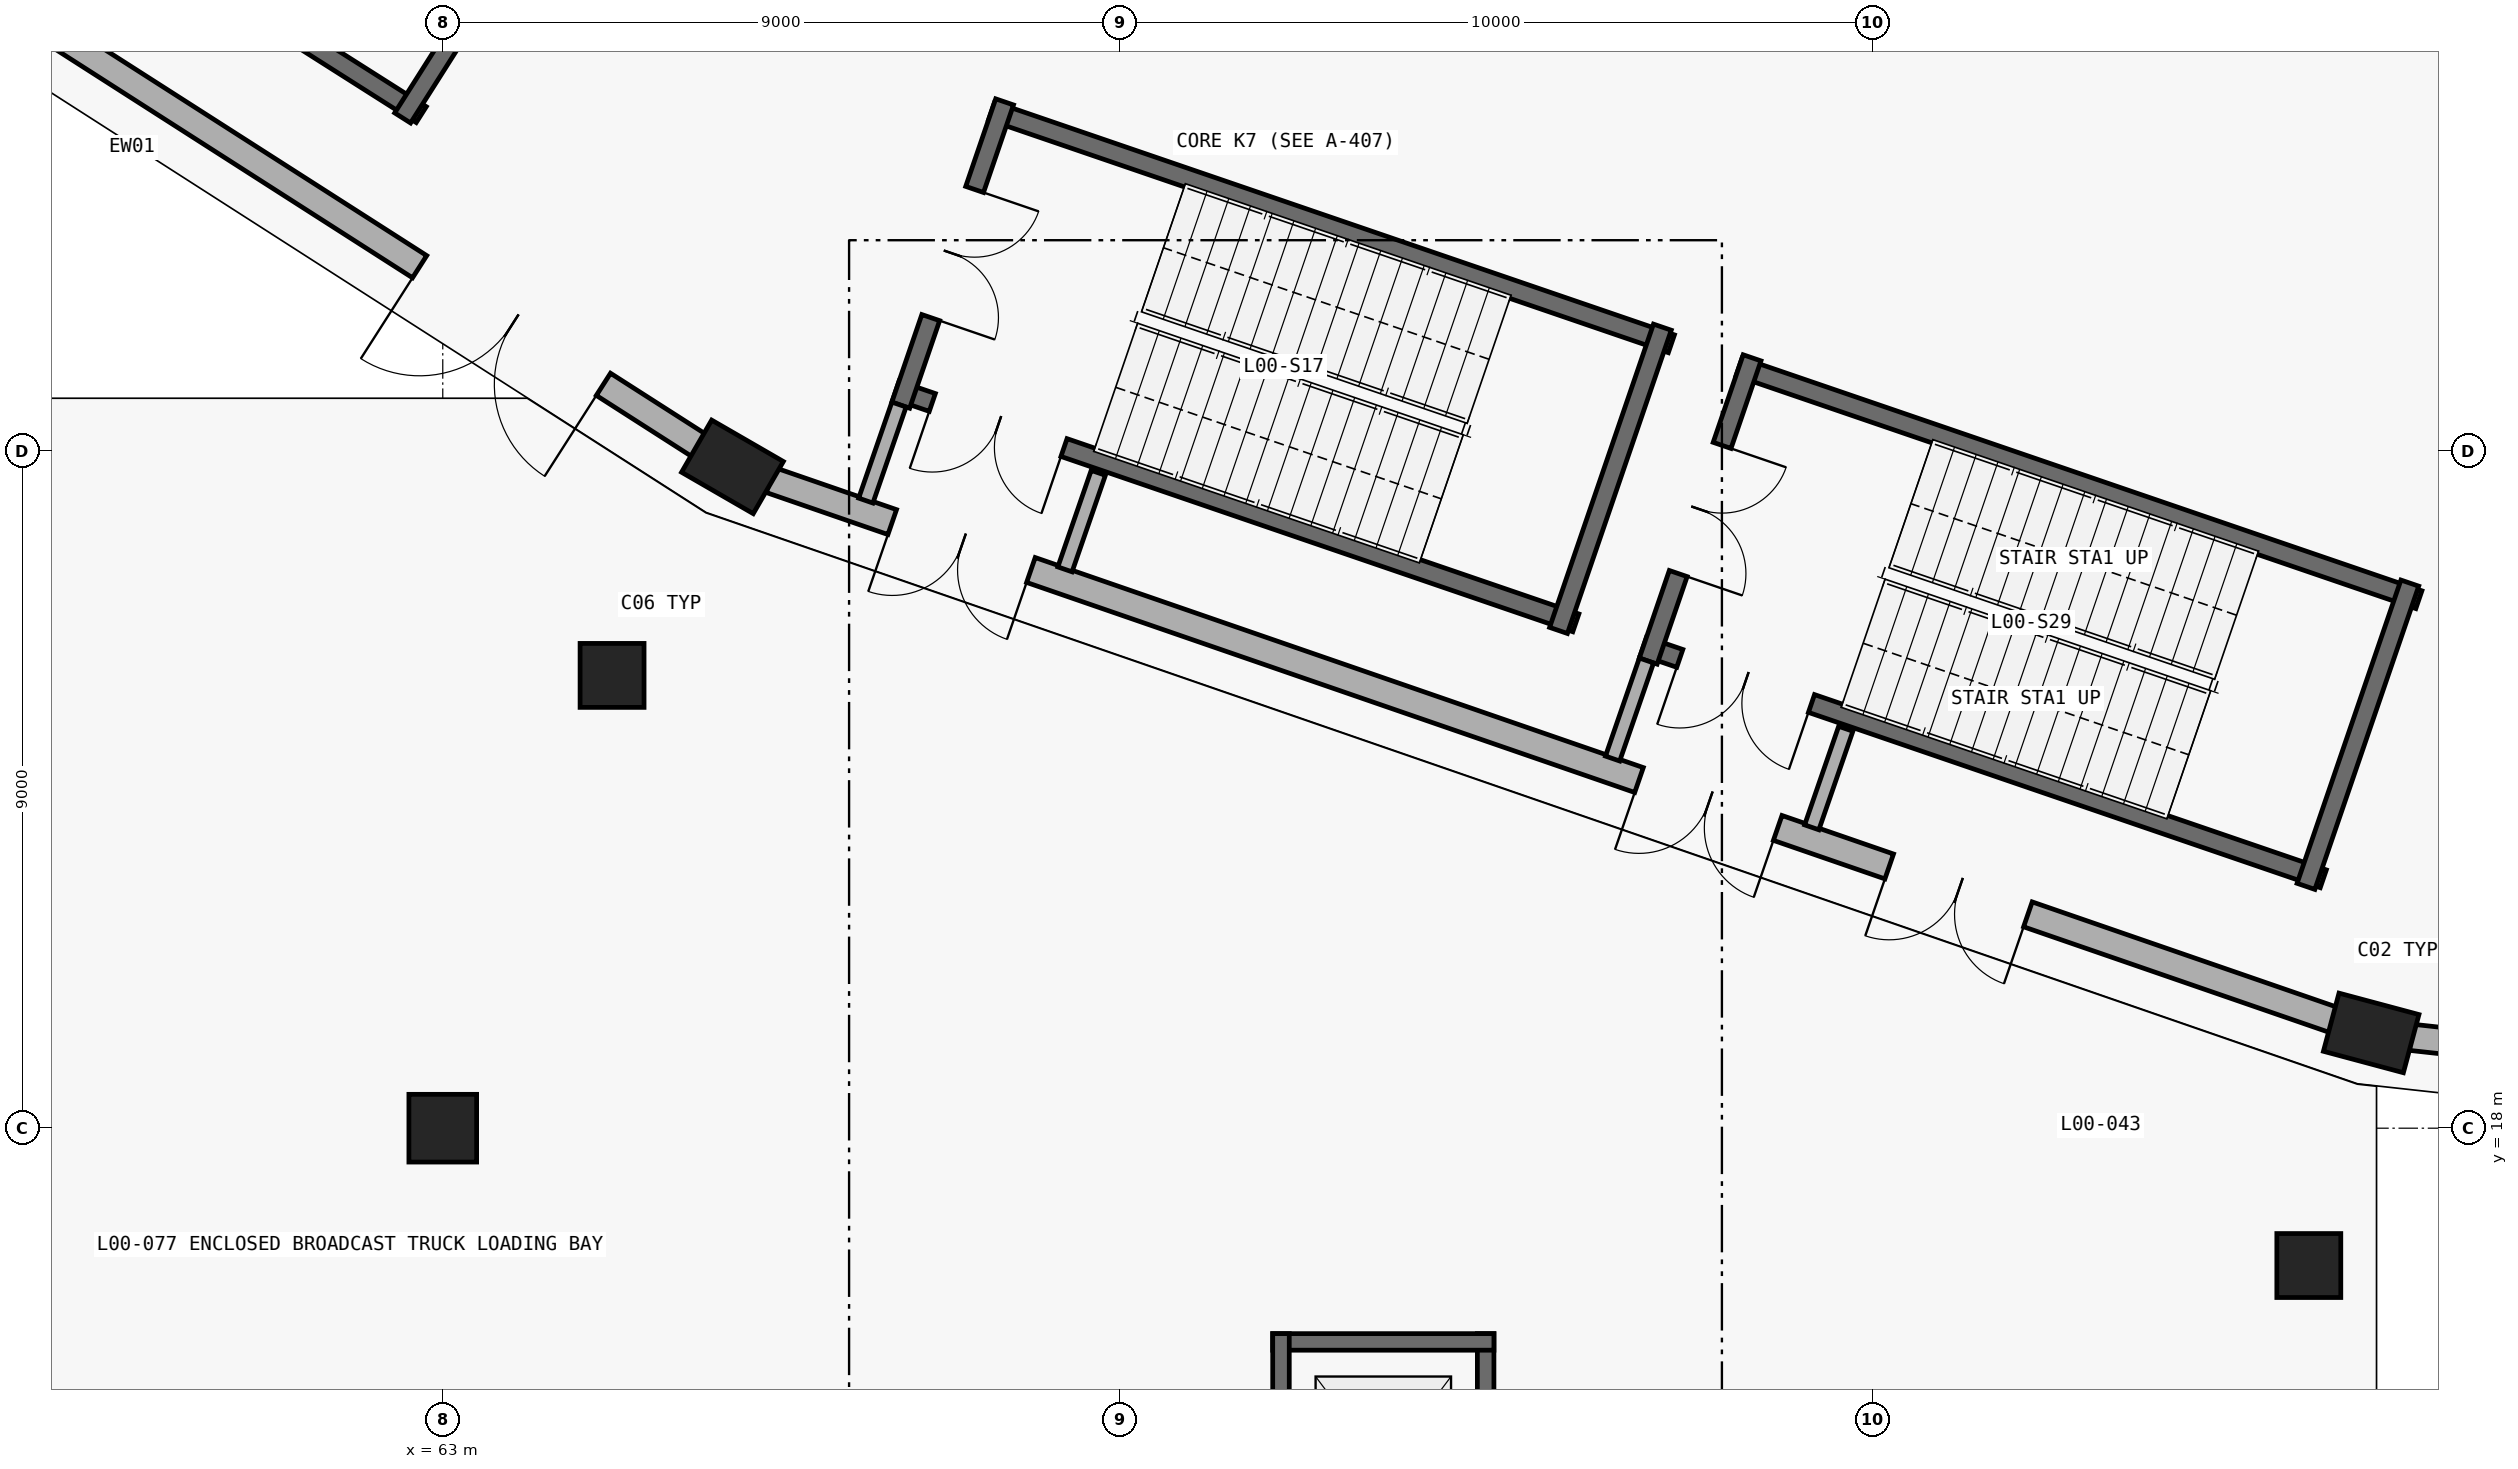
"""IFC4 building model, lengths in metres.
Left out: names, types, materials, properties, quantities, classifications, styles, units other than length and angle.
Written with IfcOpenShell. Run it as: python <this file> out.ifc"""

import sys

from ifc_helpers import new_model, si_unit, direction, frame, frame_2d, origin, origin_2d, place, context, subcontext, project, spatial, rectangle, circle, extrude, element, fill, save


model = new_model("IFC4")
c1 = context("Model", 3, precision=1e-05, world=origin(), true_north=direction((0.0, 1.0)))
c2 = subcontext(c1, "Body", "Model", "MODEL_VIEW")
j1 = project(units=[si_unit("LENGTHUNIT", "METRE"), si_unit("PLANEANGLEUNIT", "RADIAN")], contexts=[c1])
p1 = place(None, origin())
s1 = spatial("IfcSite", under=j1, at=p1, CompositionType="ELEMENT")
p2 = place(p1, origin())
s2 = spatial("IfcBuilding", under=s1, at=p2, CompositionType="ELEMENT")
p3 = place(p2, origin())
s3 = spatial("IfcBuildingStorey", under=s2, at=p3, CompositionType="ELEMENT", Elevation=0.0)
p4 = place(p3, frame((66.85, 26.788, 0.0), z_axis=(0.0, 0.0, 1.0), x_axis=(0.5, 0.866025403784, 0.0)))
e1 = element("IfcColumn", 1, at=p4, inside=s3, PredefinedType="COLUMN", context=c2, shape_type="SweptSolid", body=[
    extrude(rectangle(XDim=0.8, YDim=1.1, at=origin_2d()), origin(), (0.0, 0.0, 1.0), 5.4),
])
p5 = place(p3, frame((65.25, 24.017, 0.0), z_axis=(0.0, 0.0, 1.0), x_axis=(1.0, 0.0, 0.0)))
e2 = element("IfcColumn", 2, at=p5, inside=s3, PredefinedType="COLUMN", context=c2, shape_type="SweptSolid", body=[
    extrude(circle(Radius=0.425, at=origin_2d()), origin(), (0.0, 0.0, 1.0), 5.4),
])
p6 = place(p3, frame((88.629, 19.266, 0.0), z_axis=(0.0, 0.0, 1.0), x_axis=(0.258819045103, 0.965925826289, 0.0)))
e3 = element("IfcColumn", 3, at=p6, inside=s3, PredefinedType="COLUMN", context=c2, shape_type="SweptSolid", body=[
    extrude(rectangle(XDim=0.8, YDim=1.1, at=origin_2d()), origin(), (0.0, 0.0, 1.0), 5.4),
])
p7 = place(p3, frame((87.8, 16.175, 0.0), z_axis=(0.0, 0.0, 1.0), x_axis=(1.0, 0.0, 0.0)))
e4 = element("IfcColumn", 4, at=p7, inside=s3, PredefinedType="COLUMN", context=c2, shape_type="SweptSolid", body=[
    extrude(circle(Radius=0.425, at=origin_2d()), origin(), (0.0, 0.0, 1.0), 5.4),
])
p8 = place(p3, frame((63.0, 18.0, 0.0), z_axis=(0.0, 0.0, 1.0), x_axis=(1.0, 0.0, 0.0)))
e5 = element("IfcColumn", 5, at=p8, inside=s3, PredefinedType="COLUMN", context=c2, shape_type="SweptSolid", body=[
    extrude(rectangle(XDim=0.9, YDim=0.9, at=origin_2d()), origin(), (0.0, 0.0, 1.0), 5.4),
])
p9 = place(p3, frame((66.407, 27.071, 0.0), z_axis=(0.0, 0.0, 1.0), x_axis=(-0.842308733224, 0.538995359845, 0.0)))
e6 = element("IfcWall", 6, at=p9, inside=s3, PredefinedType="STANDARD", context=c2, shape_type="SweptSolid", body=[
    extrude(rectangle(XDim=21.139, YDim=0.35, at=frame_2d((10.57, 0.0))), origin(), (0.0, 0.0, 1.0), 4.165),
])
p10 = place(p9, frame((12.556, 0.0, 0.0)))
e7 = element("IfcOpeningElement", 7, at=p10, cuts=e6, PredefinedType="OPENING", context=c2, shape_type="SweptSolid", body=[
    extrude(rectangle(XDim=1.95, YDim=2.25, at=frame_2d((0.975, 1.125))), frame((0.0, 0.185, 0.0), z_axis=(0.0, -1.0, 0.0), x_axis=(1.0, 0.0, 0.0)), (0.0, 0.0, 1.0), 0.37),
])
p11 = place(p9, frame((1.51, 0.0, 0.0)))
e8 = element("IfcOpeningElement", 8, at=p11, cuts=e6, PredefinedType="OPENING", context=c2, shape_type="SweptSolid", body=[
    extrude(rectangle(XDim=2.9, YDim=2.52, at=frame_2d((1.45, 1.26))), frame((0.0, 0.185, 0.0), z_axis=(0.0, -1.0, 0.0), x_axis=(1.0, 0.0, 0.0)), (0.0, 0.0, 1.0), 0.37),
])
p12 = place(p3, frame((88.131, 19.438, 0.0), z_axis=(0.0, 0.0, 1.0), x_axis=(-0.945215757663, 0.326446276538, 0.0)))
e9 = element("IfcWall", 9, at=p12, inside=s3, PredefinedType="STANDARD", context=c2, shape_type="SweptSolid", body=[
    extrude(rectangle(XDim=21.979, YDim=0.35, at=frame_2d((10.99, 0.0))), origin(), (0.0, 0.0, 1.0), 4.165),
])
p13 = place(p12, frame((18.318, 0.0, 0.0)))
e10 = element("IfcOpeningElement", 10, at=p13, cuts=e9, PredefinedType="OPENING", context=c2, shape_type="SweptSolid", body=[
    extrude(rectangle(XDim=1.95, YDim=2.25, at=frame_2d((0.975, 1.125))), frame((0.0, 0.185, 0.0), z_axis=(0.0, -1.0, 0.0), x_axis=(1.0, 0.0, 0.0)), (0.0, 0.0, 1.0), 0.37),
])
p14 = place(p12, frame((7.818, 0.0, 0.0)))
e11 = element("IfcOpeningElement", 11, at=p14, cuts=e9, PredefinedType="OPENING", context=c2, shape_type="SweptSolid", body=[
    extrude(rectangle(XDim=1.95, YDim=2.25, at=frame_2d((0.975, 1.125))), frame((0.0, 0.185, 0.0), z_axis=(0.0, -1.0, 0.0), x_axis=(1.0, 0.0, 0.0)), (0.0, 0.0, 1.0), 0.37),
])
p15 = place(p12, frame((4.3, 0.0, 0.0)))
e12 = element("IfcOpeningElement", 12, at=p15, cuts=e9, PredefinedType="OPENING", context=c2, shape_type="SweptSolid", body=[
    extrude(rectangle(XDim=1.95, YDim=2.25, at=frame_2d((0.975, 1.125))), frame((0.0, 0.185, 0.0), z_axis=(0.0, -1.0, 0.0), x_axis=(1.0, 0.0, 0.0)), (0.0, 0.0, 1.0), 0.37),
])
p16 = place(p3, frame((111.475, 16.758, 0.0), z_axis=(0.0, 0.0, 1.0), x_axis=(-0.994028735725, 0.10911861689, 0.0)))
e13 = element("IfcWall", 13, at=p16, inside=s3, PredefinedType="STANDARD", context=c2, shape_type="SweptSolid", body=[
    extrude(rectangle(XDim=22.452, YDim=0.35, at=frame_2d((11.226, 0.0))), origin(), (0.0, 0.0, 1.0), 4.165),
])
p17 = place(p16, frame((18.697, 0.0, 0.0)))
e14 = element("IfcOpeningElement", 14, at=p17, cuts=e13, PredefinedType="OPENING", context=c2, shape_type="SweptSolid", body=[
    extrude(rectangle(XDim=1.95, YDim=2.25, at=frame_2d((0.975, 1.125))), frame((0.0, 0.185, 0.0), z_axis=(0.0, -1.0, 0.0), x_axis=(1.0, 0.0, 0.0)), (0.0, 0.0, 1.0), 0.37),
])
p18 = place(p16, frame((8.197, 0.0, 0.0)))
e15 = element("IfcOpeningElement", 15, at=p18, cuts=e13, PredefinedType="OPENING", context=c2, shape_type="SweptSolid", body=[
    extrude(rectangle(XDim=1.95, YDim=2.25, at=frame_2d((0.975, 1.125))), frame((0.0, 0.185, 0.0), z_axis=(0.0, -1.0, 0.0), x_axis=(1.0, 0.0, 0.0)), (0.0, 0.0, 1.0), 0.37),
])
p19 = place(p16, frame((4.413, 0.0, 0.0)))
e16 = element("IfcOpeningElement", 16, at=p19, cuts=e13, PredefinedType="OPENING", context=c2, shape_type="SweptSolid", body=[
    extrude(rectangle(XDim=1.95, YDim=2.25, at=frame_2d((0.975, 1.125))), frame((0.0, 0.185, 0.0), z_axis=(0.0, -1.0, 0.0), x_axis=(1.0, 0.0, 0.0)), (0.0, 0.0, 1.0), 0.37),
])
p20 = place(p3, frame((62.714, 31.469, 0.0), z_axis=(0.0, 0.0, 1.0), x_axis=(-0.844391246241, 0.535727004427, 0.0)))
e17 = element("IfcWall", 17, at=p20, inside=s3, PredefinedType="SHEAR", context=c2, shape_type="SweptSolid", body=[
    extrude(rectangle(XDim=9.55, YDim=0.25, at=frame_2d((4.775, 0.0))), origin(), (0.0, 0.0, 1.0), 5.1),
])
p21 = place(p20, frame((7.19, 0.0, 0.0)))
e18 = element("IfcOpeningElement", 18, at=p21, cuts=e17, PredefinedType="OPENING", context=c2, shape_type="SweptSolid", body=[
    extrude(rectangle(XDim=1.85, YDim=2.3, at=frame_2d((0.925, 1.15))), frame((0.0, 0.135, 0.0), z_axis=(0.0, -1.0, 0.0), x_axis=(1.0, 0.0, 0.0)), (0.0, 0.0, 1.0), 0.27),
])
p22 = place(p3, frame((62.467, 31.425, 0.0), z_axis=(0.0, 0.0, 1.0), x_axis=(0.53572544074, 0.844392238325, 0.0)))
e19 = element("IfcWall", 19, at=p22, inside=s3, PredefinedType="SHEAR", context=c2, shape_type="SweptSolid", body=[
    extrude(rectangle(XDim=4.26, YDim=0.25, at=frame_2d((2.13, 0.0))), origin(), (0.0, 0.0, 1.0), 5.1),
])
p23 = place(p3, frame((78.059, 24.715, 0.0), z_axis=(0.0, 0.0, 1.0), x_axis=(-0.946064424228, 0.323978556712, 0.0)))
e20 = element("IfcWall", 20, at=p23, inside=s3, PredefinedType="SHEAR", context=c2, shape_type="SweptSolid", body=[
    extrude(rectangle(XDim=9.55, YDim=0.25, at=frame_2d((4.775, 0.0))), origin(), (0.0, 0.0, 1.0), 5.1),
])
p24 = place(p23, frame((7.19, 0.0, 0.0)))
e21 = element("IfcOpeningElement", 21, at=p24, cuts=e20, PredefinedType="OPENING", context=c2, shape_type="SweptSolid", body=[
    extrude(rectangle(XDim=1.85, YDim=2.3, at=frame_2d((0.925, 1.15))), frame((0.0, 0.135, 0.0), z_axis=(0.0, -1.0, 0.0), x_axis=(1.0, 0.0, 0.0)), (0.0, 0.0, 1.0), 0.27),
])
p25 = place(p3, frame((79.328, 28.424, 0.0), z_axis=(0.0, 0.0, 1.0), x_axis=(-0.946064424228, 0.323978556712, 0.0)))
e22 = element("IfcWall", 22, at=p25, inside=s3, PredefinedType="SHEAR", context=c2, shape_type="SweptSolid", body=[
    extrude(rectangle(XDim=9.55, YDim=0.25, at=frame_2d((4.775, 0.0))), origin(), (0.0, 0.0, 1.0), 5.1),
])
p26 = place(p3, frame((70.467, 31.638, 0.0), z_axis=(0.0, 0.0, 1.0), x_axis=(-0.323971192516, -0.946066946056, 0.0)))
e23 = element("IfcWall", 23, at=p26, inside=s3, PredefinedType="SHEAR", context=c2, shape_type="SweptSolid", body=[
    extrude(rectangle(XDim=4.26, YDim=0.25, at=frame_2d((2.13, 0.0))), origin(), (0.0, 0.0, 1.0), 5.1),
])
p27 = place(p26, frame((1.23, 0.0, 0.0)))
e24 = element("IfcOpeningElement", 24, at=p27, cuts=e23, PredefinedType="OPENING", context=c2, shape_type="SweptSolid", body=[
    extrude(rectangle(XDim=1.8, YDim=2.25, at=frame_2d((0.9, 1.125))), frame((0.0, 0.135, 0.0), z_axis=(0.0, -1.0, 0.0), x_axis=(1.0, 0.0, 0.0)), (0.0, 0.0, 1.0), 0.27),
])
p28 = place(p3, frame((77.828, 24.615, 0.0), z_axis=(0.0, 0.0, 1.0), x_axis=(0.323971192516, 0.946066946056, 0.0)))
e25 = element("IfcWall", 25, at=p28, inside=s3, PredefinedType="SHEAR", context=c2, shape_type="SweptSolid", body=[
    extrude(rectangle(XDim=4.26, YDim=0.25, at=frame_2d((2.13, 0.0))), origin(), (0.0, 0.0, 1.0), 5.1),
])
p29 = place(p3, frame((87.992, 21.314, 0.0), z_axis=(0.0, 0.0, 1.0), x_axis=(-0.946072259645, 0.323955675256, 0.0)))
e26 = element("IfcWall", 26, at=p29, inside=s3, PredefinedType="SHEAR", context=c2, shape_type="SweptSolid", body=[
    extrude(rectangle(XDim=9.55, YDim=0.25, at=frame_2d((4.775, 0.0))), origin(), (0.0, 0.0, 1.0), 5.1),
])
p30 = place(p29, frame((7.19, 0.0, 0.0)))
e27 = element("IfcOpeningElement", 27, at=p30, cuts=e26, PredefinedType="OPENING", context=c2, shape_type="SweptSolid", body=[
    extrude(rectangle(XDim=1.85, YDim=2.3, at=frame_2d((0.925, 1.15))), frame((0.0, 0.135, 0.0), z_axis=(0.0, -1.0, 0.0), x_axis=(1.0, 0.0, 0.0)), (0.0, 0.0, 1.0), 0.27),
])
p31 = place(p3, frame((89.262, 25.023, 0.0), z_axis=(0.0, 0.0, 1.0), x_axis=(-0.946064424228, 0.323978556712, 0.0)))
e28 = element("IfcWall", 28, at=p31, inside=s3, PredefinedType="SHEAR", context=c2, shape_type="SweptSolid", body=[
    extrude(rectangle(XDim=9.55, YDim=0.25, at=frame_2d((4.775, 0.0))), origin(), (0.0, 0.0, 1.0), 5.1),
])
p32 = place(p3, frame((80.401, 28.237, 0.0), z_axis=(0.0, 0.0, 1.0), x_axis=(-0.323971192516, -0.946066946056, 0.0)))
e29 = element("IfcWall", 29, at=p32, inside=s3, PredefinedType="SHEAR", context=c2, shape_type="SweptSolid", body=[
    extrude(rectangle(XDim=4.26, YDim=0.25, at=frame_2d((2.13, 0.0))), origin(), (0.0, 0.0, 1.0), 5.1),
])
p33 = place(p32, frame((1.23, 0.0, 0.0)))
e30 = element("IfcOpeningElement", 30, at=p33, cuts=e29, PredefinedType="OPENING", context=c2, shape_type="SweptSolid", body=[
    extrude(rectangle(XDim=1.8, YDim=2.25, at=frame_2d((0.9, 1.125))), frame((0.0, 0.135, 0.0), z_axis=(0.0, -1.0, 0.0), x_axis=(1.0, 0.0, 0.0)), (0.0, 0.0, 1.0), 0.27),
])
p34 = place(p3, frame((87.762, 21.213, 0.0), z_axis=(0.0, 0.0, 1.0), x_axis=(0.323971192516, 0.946066946056, 0.0)))
e31 = element("IfcWall", 31, at=p34, inside=s3, PredefinedType="SHEAR", context=c2, shape_type="SweptSolid", body=[
    extrude(rectangle(XDim=4.26, YDim=0.25, at=frame_2d((2.13, 0.0))), origin(), (0.0, 0.0, 1.0), 5.1),
])
p35 = place(p3, frame((69.063, 27.616, 0.0), z_axis=(0.0, 0.0, 1.0), x_axis=(-0.326626008273, -0.945153665136, 0.0)))
e32 = element("IfcWall", 32, at=p35, inside=s3, PredefinedType="PARTITIONING", context=c2, shape_type="SweptSolid", body=[
    extrude(rectangle(XDim=1.35, YDim=0.2, at=frame_2d((0.675, 0.0))), origin(), (0.0, 0.0, 1.0), 4.165),
])
p36 = place(p3, frame((71.712, 26.709, 0.0), z_axis=(0.0, 0.0, 1.0), x_axis=(-0.326461818728, -0.945210389761, 0.0)))
e33 = element("IfcWall", 33, at=p36, inside=s3, PredefinedType="PARTITIONING", context=c2, shape_type="SweptSolid", body=[
    extrude(rectangle(XDim=1.357, YDim=0.2, at=frame_2d((0.679, 0.0))), origin(), (0.0, 0.0, 1.0), 4.165),
])
p37 = place(p3, frame((78.997, 24.215, 0.0), z_axis=(0.0, 0.0, 1.0), x_axis=(-0.326410930849, -0.945227964156, 0.0)))
e34 = element("IfcWall", 34, at=p37, inside=s3, PredefinedType="PARTITIONING", context=c2, shape_type="SweptSolid", body=[
    extrude(rectangle(XDim=1.378, YDim=0.2, at=frame_2d((0.689, 0.0))), origin(), (0.0, 0.0, 1.0), 4.165),
])
p38 = place(p3, frame((81.646, 23.308, 0.0), z_axis=(0.0, 0.0, 1.0), x_axis=(-0.32614815498, -0.945318666378, 0.0)))
e35 = element("IfcWall", 35, at=p38, inside=s3, PredefinedType="PARTITIONING", context=c2, shape_type="SweptSolid", body=[
    extrude(rectangle(XDim=1.385, YDim=0.2, at=frame_2d((0.693, 0.0))), origin(), (0.0, 0.0, 1.0), 4.165),
])
p39 = place(p3, frame((76.86, 11.73, 0.0), z_axis=(0.0, 0.0, 1.0), x_axis=(0.0, 1.0, 0.0)))
e36 = element("IfcWall", 36, at=p39, inside=s3, PredefinedType="SHEAR", context=c2, shape_type="SweptSolid", body=[
    extrude(rectangle(XDim=3.54, YDim=0.22, at=frame_2d((1.77, 0.0))), origin(), (0.0, 0.0, 1.0), 5.1),
])
p40 = place(p3, frame((76.97, 15.16, 0.0), z_axis=(0.0, 0.0, 1.0), x_axis=(-1.0, 0.0, 0.0)))
e37 = element("IfcWall", 37, at=p40, inside=s3, PredefinedType="SHEAR", context=c2, shape_type="SweptSolid", body=[
    extrude(rectangle(XDim=2.94, YDim=0.22, at=frame_2d((1.47, 0.0))), origin(), (0.0, 0.0, 1.0), 5.1),
])
p41 = place(p3, frame((74.14, 15.27, 0.0), z_axis=(0.0, 0.0, 1.0), x_axis=(0.0, -1.0, 0.0)))
e38 = element("IfcWall", 38, at=p41, inside=s3, PredefinedType="SHEAR", context=c2, shape_type="SweptSolid", body=[
    extrude(rectangle(XDim=3.54, YDim=0.22, at=frame_2d((1.77, 0.0))), origin(), (0.0, 0.0, 1.0), 5.1),
])
p42 = place(p11, origin())
e39 = element("IfcDoor", 39, at=p42, inside=s3, OperationType="DOUBLE_DOOR_SINGLE_SWING", PredefinedType="DOOR", context=c2, shape_type="SweptSolid", body=[
    extrude(rectangle(XDim=2.9, YDim=2.52, at=frame_2d((1.45, 1.26))), frame((0.0, 0.025, 0.0), z_axis=(0.0, -1.0, 0.0), x_axis=(1.0, 0.0, 0.0)), (0.0, 0.0, 1.0), 0.05),
])
fill(e8, e39)
p43 = place(p13, origin())
e40 = element("IfcDoor", 40, at=p43, inside=s3, OperationType="DOUBLE_DOOR_SINGLE_SWING", PredefinedType="DOOR", context=c2, shape_type="SweptSolid", body=[
    extrude(rectangle(XDim=1.95, YDim=2.25, at=frame_2d((0.975, 1.125))), frame((0.0, 0.025, 0.0), z_axis=(0.0, -1.0, 0.0), x_axis=(1.0, 0.0, 0.0)), (0.0, 0.0, 1.0), 0.05),
])
fill(e10, e40)
p44 = place(p14, origin())
e41 = element("IfcDoor", 41, at=p44, inside=s3, OperationType="DOUBLE_DOOR_SINGLE_SWING", PredefinedType="DOOR", context=c2, shape_type="SweptSolid", body=[
    extrude(rectangle(XDim=1.95, YDim=2.25, at=frame_2d((0.975, 1.125))), frame((0.0, 0.025, 0.0), z_axis=(0.0, -1.0, 0.0), x_axis=(1.0, 0.0, 0.0)), (0.0, 0.0, 1.0), 0.05),
])
fill(e11, e41)
p45 = place(p15, origin())
e42 = element("IfcDoor", 42, at=p45, inside=s3, OperationType="DOUBLE_DOOR_SINGLE_SWING", PredefinedType="DOOR", context=c2, shape_type="SweptSolid", body=[
    extrude(rectangle(XDim=1.95, YDim=2.25, at=frame_2d((0.975, 1.125))), frame((0.0, 0.025, 0.0), z_axis=(0.0, -1.0, 0.0), x_axis=(1.0, 0.0, 0.0)), (0.0, 0.0, 1.0), 0.05),
])
fill(e12, e42)
p46 = place(p27, origin())
e43 = element("IfcDoor", 43, at=p46, inside=s3, OperationType="DOUBLE_DOOR_SINGLE_SWING", PredefinedType="DOOR", context=c2, shape_type="SweptSolid", body=[
    extrude(rectangle(XDim=1.8, YDim=2.25, at=frame_2d((0.9, 1.125))), frame((0.0, 0.025, 0.0), z_axis=(0.0, -1.0, 0.0), x_axis=(1.0, 0.0, 0.0)), (0.0, 0.0, 1.0), 0.05),
])
fill(e24, e43)
p47 = place(p24, origin())
e44 = element("IfcDoor", 44, at=p47, inside=s3, OperationType="DOUBLE_DOOR_SINGLE_SWING", PredefinedType="DOOR", context=c2, shape_type="SweptSolid", body=[
    extrude(rectangle(XDim=1.85, YDim=2.3, at=frame_2d((0.925, 1.15))), frame((0.0, 0.025, 0.0), z_axis=(0.0, -1.0, 0.0), x_axis=(1.0, 0.0, 0.0)), (0.0, 0.0, 1.0), 0.05),
])
fill(e21, e44)
p48 = place(p33, origin())
e45 = element("IfcDoor", 45, at=p48, inside=s3, OperationType="DOUBLE_DOOR_SINGLE_SWING", PredefinedType="DOOR", context=c2, shape_type="SweptSolid", body=[
    extrude(rectangle(XDim=1.8, YDim=2.25, at=frame_2d((0.9, 1.125))), frame((0.0, 0.025, 0.0), z_axis=(0.0, -1.0, 0.0), x_axis=(1.0, 0.0, 0.0)), (0.0, 0.0, 1.0), 0.05),
])
fill(e30, e45)
p49 = place(p30, origin())
e46 = element("IfcDoor", 46, at=p49, inside=s3, OperationType="DOUBLE_DOOR_SINGLE_SWING", PredefinedType="DOOR", context=c2, shape_type="SweptSolid", body=[
    extrude(rectangle(XDim=1.85, YDim=2.3, at=frame_2d((0.925, 1.15))), frame((0.0, 0.025, 0.0), z_axis=(0.0, -1.0, 0.0), x_axis=(1.0, 0.0, 0.0)), (0.0, 0.0, 1.0), 0.05),
])
fill(e27, e46)
save(model, sys.argv[1])
